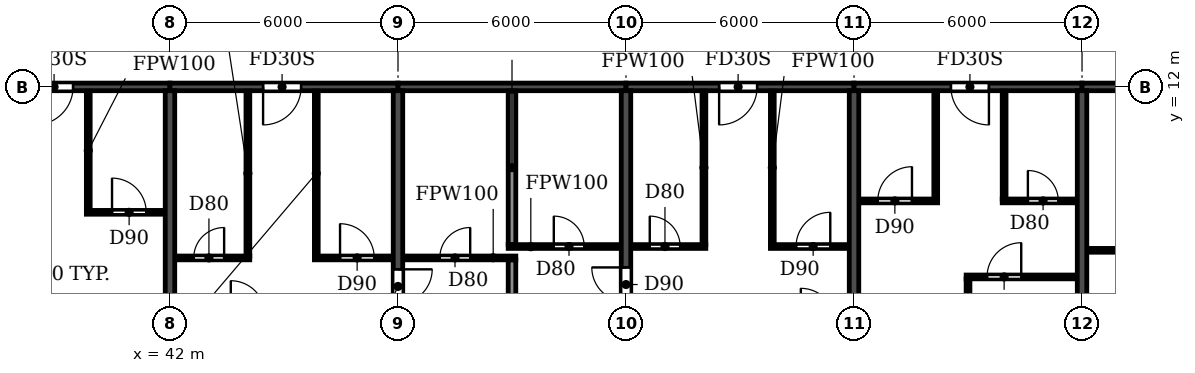
"""IFC4 building model, lengths in metres.
Left out: names, types, materials, properties, quantities, classifications, styles, units other than length and angle.
Written with IfcOpenShell. Run it as: python <this file> out.ifc"""

import sys

from ifc_helpers import new_model, si_unit, direction, frame, frame_2d, origin, place, context, subcontext, project, spatial, rectangle, extrude, element, fill, save


model = new_model("IFC4")
c1 = context("Model", 3, precision=1e-05, world=origin(), true_north=direction((0.0, 1.0)))
c2 = subcontext(c1, "Body", "Model", "MODEL_VIEW")
j1 = project(units=[si_unit("LENGTHUNIT", "METRE"), si_unit("PLANEANGLEUNIT", "RADIAN")], contexts=[c1])
p1 = place(None, origin())
s1 = spatial("IfcSite", under=j1, at=p1, CompositionType="ELEMENT")
p2 = place(p1, origin())
s2 = spatial("IfcBuilding", under=s1, at=p2, CompositionType="ELEMENT")
p3 = place(p2, frame((0.0, 0.0, 241.2)))
s3 = spatial("IfcBuildingStorey", under=s2, at=p3, CompositionType="ELEMENT", Elevation=241.2)
p4 = place(p3, frame((42.0, 0.2, 0.0), z_axis=(0.0, 0.0, 1.0), x_axis=(0.0, 1.0, 0.0)))
e1 = element("IfcWall", 1, at=p4, inside=s3, PredefinedType="SHEAR", context=c2, shape_type="SweptSolid", body=[
    extrude(rectangle(XDim=11.7, YDim=0.25, at=frame_2d((5.85, 0.0))), origin(), (0.0, 0.0, 1.0), 3.08),
])
p5 = place(p3, frame((48.0, 0.2, 0.0), z_axis=(0.0, 0.0, 1.0), x_axis=(0.0, 1.0, 0.0)))
e2 = element("IfcWall", 2, at=p5, inside=s3, PredefinedType="SHEAR", context=c2, shape_type="SweptSolid", body=[
    extrude(rectangle(XDim=11.7, YDim=0.25, at=frame_2d((5.85, 0.0))), origin(), (0.0, 0.0, 1.0), 3.08),
])
p6 = place(p5, frame((6.1, 0.0, 0.0)))
e3 = element("IfcOpeningElement", 3, at=p6, cuts=e2, PredefinedType="OPENING", context=c2, shape_type="SweptSolid", body=[
    extrude(rectangle(XDim=0.9, YDim=2.1, at=frame_2d((0.45, 1.05))), frame((0.0, 0.135, 0.0), z_axis=(0.0, -1.0, 0.0), x_axis=(1.0, 0.0, 0.0)), (0.0, 0.0, 1.0), 0.27),
])
p7 = place(p3, frame((54.0, 0.2, 0.0), z_axis=(0.0, 0.0, 1.0), x_axis=(0.0, 1.0, 0.0)))
e4 = element("IfcWall", 4, at=p7, inside=s3, PredefinedType="SHEAR", context=c2, shape_type="SweptSolid", body=[
    extrude(rectangle(XDim=11.7, YDim=0.25, at=frame_2d((5.85, 0.0))), origin(), (0.0, 0.0, 1.0), 3.08),
])
p8 = place(p7, frame((6.15, 0.0, 0.0)))
e5 = element("IfcOpeningElement", 5, at=p8, cuts=e4, PredefinedType="OPENING", context=c2, shape_type="SweptSolid", body=[
    extrude(rectangle(XDim=0.9, YDim=2.1, at=frame_2d((0.45, 1.05))), frame((0.0, 0.135, 0.0), z_axis=(0.0, -1.0, 0.0), x_axis=(1.0, 0.0, 0.0)), (0.0, 0.0, 1.0), 0.27),
])
for number, where, z_axis, x_axis in (
    (6, (60.0, 0.2, 0.0), (0.0, 0.0, 1.0), (0.0, 1.0, 0.0)),
    (7, (66.0, 0.2, 0.0), (0.0, 0.0, 1.0), (0.0, 1.0, 0.0)),
):
    element("IfcWall", number, at=place(p3, frame(where, z_axis=z_axis, x_axis=x_axis)), inside=s3, PredefinedType="SHEAR", context=c2, shape_type="SweptSolid", body=[
        extrude(rectangle(XDim=11.7, YDim=0.25, at=frame_2d((5.85, 0.0))), origin(), (0.0, 0.0, 1.0), 3.08),
    ])
p9 = place(p3, frame((36.0, 12.0, 0.0), z_axis=(0.0, 0.0, 1.0), x_axis=(1.0, 0.0, 0.0)))
e8 = element("IfcWall", 8, at=p9, inside=s3, PredefinedType="SHEAR", context=c2, shape_type="SweptSolid", body=[
    extrude(rectangle(XDim=6.0, YDim=0.2, at=frame_2d((3.0, 0.0))), origin(), (0.0, 0.0, 1.0), 2.48),
])
p10 = place(p9, frame((2.45, 0.0, 0.0)))
e9 = element("IfcOpeningElement", 9, at=p10, cuts=e8, PredefinedType="OPENING", context=c2, shape_type="SweptSolid", body=[
    extrude(rectangle(XDim=1.0, YDim=2.1, at=frame_2d((0.5, 1.05))), frame((0.0, 0.11, 0.0), z_axis=(0.0, -1.0, 0.0), x_axis=(1.0, 0.0, 0.0)), (0.0, 0.0, 1.0), 0.22),
])
p11 = place(p3, frame((42.0, 12.0, 0.0), z_axis=(0.0, 0.0, 1.0), x_axis=(1.0, 0.0, 0.0)))
e10 = element("IfcWall", 10, at=p11, inside=s3, PredefinedType="SHEAR", context=c2, shape_type="SweptSolid", body=[
    extrude(rectangle(XDim=6.0, YDim=0.2, at=frame_2d((3.0, 0.0))), origin(), (0.0, 0.0, 1.0), 2.48),
])
p12 = place(p11, frame((2.45, 0.0, 0.0)))
e11 = element("IfcOpeningElement", 11, at=p12, cuts=e10, PredefinedType="OPENING", context=c2, shape_type="SweptSolid", body=[
    extrude(rectangle(XDim=1.0, YDim=2.1, at=frame_2d((0.5, 1.05))), frame((0.0, 0.11, 0.0), z_axis=(0.0, -1.0, 0.0), x_axis=(1.0, 0.0, 0.0)), (0.0, 0.0, 1.0), 0.22),
])
p13 = place(p3, frame((48.0, 12.0, 0.0), z_axis=(0.0, 0.0, 1.0), x_axis=(1.0, 0.0, 0.0)))
e12 = element("IfcWall", 12, at=p13, inside=s3, PredefinedType="SHEAR", context=c2, shape_type="SweptSolid", body=[
    extrude(rectangle(XDim=6.0, YDim=0.2, at=frame_2d((3.0, 0.0))), origin(), (0.0, 0.0, 1.0), 2.48),
])
p14 = place(p3, frame((54.0, 12.0, 0.0), z_axis=(0.0, 0.0, 1.0), x_axis=(1.0, 0.0, 0.0)))
e13 = element("IfcWall", 13, at=p14, inside=s3, PredefinedType="SHEAR", context=c2, shape_type="SweptSolid", body=[
    extrude(rectangle(XDim=6.0, YDim=0.2, at=frame_2d((3.0, 0.0))), origin(), (0.0, 0.0, 1.0), 2.48),
])
p15 = place(p14, frame((2.45, 0.0, 0.0)))
e14 = element("IfcOpeningElement", 14, at=p15, cuts=e13, PredefinedType="OPENING", context=c2, shape_type="SweptSolid", body=[
    extrude(rectangle(XDim=1.0, YDim=2.1, at=frame_2d((0.5, 1.05))), frame((0.0, 0.11, 0.0), z_axis=(0.0, -1.0, 0.0), x_axis=(1.0, 0.0, 0.0)), (0.0, 0.0, 1.0), 0.22),
])
p16 = place(p3, frame((60.0, 12.0, 0.0), z_axis=(0.0, 0.0, 1.0), x_axis=(1.0, 0.0, 0.0)))
e15 = element("IfcWall", 15, at=p16, inside=s3, PredefinedType="SHEAR", context=c2, shape_type="SweptSolid", body=[
    extrude(rectangle(XDim=6.0, YDim=0.2, at=frame_2d((3.0, 0.0))), origin(), (0.0, 0.0, 1.0), 2.48),
])
p17 = place(p16, frame((2.55, 0.0, 0.0)))
e16 = element("IfcOpeningElement", 16, at=p17, cuts=e15, PredefinedType="OPENING", context=c2, shape_type="SweptSolid", body=[
    extrude(rectangle(XDim=1.0, YDim=2.1, at=frame_2d((0.5, 1.05))), frame((0.0, 0.11, 0.0), z_axis=(0.0, -1.0, 0.0), x_axis=(1.0, 0.0, 0.0)), (0.0, 0.0, 1.0), 0.22),
])
p18 = place(p3, frame((66.0, 12.0, 0.0), z_axis=(0.0, 0.0, 1.0), x_axis=(1.0, 0.0, 0.0)))
e17 = element("IfcWall", 17, at=p18, inside=s3, PredefinedType="SHEAR", context=c2, shape_type="SweptSolid", body=[
    extrude(rectangle(XDim=6.0, YDim=0.2, at=frame_2d((3.0, 0.0))), origin(), (0.0, 0.0, 1.0), 2.48),
])
p19 = place(p18, frame((2.55, 0.0, 0.0)))
e18 = element("IfcOpeningElement", 18, at=p19, cuts=e17, PredefinedType="OPENING", context=c2, shape_type="SweptSolid", body=[
    extrude(rectangle(XDim=1.0, YDim=2.1, at=frame_2d((0.5, 1.05))), frame((0.0, 0.11, 0.0), z_axis=(0.0, -1.0, 0.0), x_axis=(1.0, 0.0, 0.0)), (0.0, 0.0, 1.0), 0.22),
])
p20 = place(p3, frame((51.0, 0.06, 0.0), z_axis=(0.0, 0.0, 1.0), x_axis=(0.0, 1.0, 0.0)))
e19 = element("IfcWall", 19, at=p20, inside=s3, PredefinedType="PARTITIONING", context=c2, shape_type="SweptSolid", body=[
    extrude(rectangle(XDim=7.39, YDim=0.2, at=frame_2d((3.695, 0.0))), origin(), (0.0, 0.0, 1.0), 3.08),
])
p21 = place(p3, frame((51.0, 7.85, 0.0), z_axis=(0.0, 0.0, 1.0), x_axis=(0.0, 1.0, 0.0)))
e20 = element("IfcWall", 20, at=p21, inside=s3, PredefinedType="PARTITIONING", context=c2, shape_type="SweptSolid", body=[
    extrude(rectangle(XDim=4.04, YDim=0.2, at=frame_2d((2.02, 0.0))), origin(), (0.0, 0.0, 1.0), 3.08),
])
p22 = place(p3, frame((62.95, 7.0, 0.0), z_axis=(0.0, 0.0, 1.0), x_axis=(1.0, 0.0, 0.0)))
e21 = element("IfcWall", 21, at=p22, inside=s3, PredefinedType="PARTITIONING", context=c2, shape_type="SweptSolid", body=[
    extrude(rectangle(XDim=2.915, YDim=0.1, at=frame_2d((1.458, 0.0))), origin(), (0.0, 0.0, 1.0), 3.08),
])
p23 = place(p22, frame((0.55, 0.0, 0.0)))
e22 = element("IfcOpeningElement", 22, at=p23, cuts=e21, PredefinedType="OPENING", context=c2, shape_type="SweptSolid", body=[
    extrude(rectangle(XDim=0.9, YDim=2.1, at=frame_2d((0.45, 1.05))), frame((0.0, 0.06, 0.0), z_axis=(0.0, -1.0, 0.0), x_axis=(1.0, 0.0, 0.0)), (0.0, 0.0, 1.0), 0.12),
])
p24 = place(p3, frame((42.135, 7.5, 0.0), z_axis=(0.0, 0.0, 1.0), x_axis=(1.0, 0.0, 0.0)))
e23 = element("IfcWall", 23, at=p24, inside=s3, PredefinedType="PARTITIONING", context=c2, shape_type="SweptSolid", body=[
    extrude(rectangle(XDim=1.965, YDim=0.1, at=frame_2d((0.982, 0.0))), origin(), (0.0, 0.0, 1.0), 3.08),
])
p25 = place(p24, frame((0.49, 0.0, 0.0)))
e24 = element("IfcOpeningElement", 24, at=p25, cuts=e23, PredefinedType="OPENING", context=c2, shape_type="SweptSolid", body=[
    extrude(rectangle(XDim=0.8, YDim=2.1, at=frame_2d((0.4, 1.05))), frame((0.0, 0.06, 0.0), z_axis=(0.0, -1.0, 0.0), x_axis=(1.0, 0.0, 0.0)), (0.0, 0.0, 1.0), 0.12),
])
p26 = place(p3, frame((45.8, 7.5, 0.0), z_axis=(0.0, 0.0, 1.0), x_axis=(1.0, 0.0, 0.0)))
e25 = element("IfcWall", 25, at=p26, inside=s3, PredefinedType="PARTITIONING", context=c2, shape_type="SweptSolid", body=[
    extrude(rectangle(XDim=2.065, YDim=0.1, at=frame_2d((1.032, 0.0))), origin(), (0.0, 0.0, 1.0), 3.08),
])
p27 = place(p26, frame((0.675, 0.0, 0.0)))
e26 = element("IfcOpeningElement", 26, at=p27, cuts=e25, PredefinedType="OPENING", context=c2, shape_type="SweptSolid", body=[
    extrude(rectangle(XDim=0.9, YDim=2.1, at=frame_2d((0.45, 1.05))), frame((0.0, 0.06, 0.0), z_axis=(0.0, -1.0, 0.0), x_axis=(1.0, 0.0, 0.0)), (0.0, 0.0, 1.0), 0.12),
])
p28 = place(p3, frame((48.135, 7.5, 0.0), z_axis=(0.0, 0.0, 1.0), x_axis=(1.0, 0.0, 0.0)))
e27 = element("IfcWall", 27, at=p28, inside=s3, PredefinedType="PARTITIONING", context=c2, shape_type="SweptSolid", body=[
    extrude(rectangle(XDim=2.965, YDim=0.1, at=frame_2d((1.482, 0.0))), origin(), (0.0, 0.0, 1.0), 3.08),
])
p29 = place(p28, frame((0.965, 0.0, 0.0)))
e28 = element("IfcOpeningElement", 28, at=p29, cuts=e27, PredefinedType="OPENING", context=c2, shape_type="SweptSolid", body=[
    extrude(rectangle(XDim=0.8, YDim=2.1, at=frame_2d((0.4, 1.05))), frame((0.0, 0.06, 0.0), z_axis=(0.0, -1.0, 0.0), x_axis=(1.0, 0.0, 0.0)), (0.0, 0.0, 1.0), 0.12),
])
p30 = place(p3, frame((66.135, 7.7, 0.0), z_axis=(0.0, 0.0, 1.0), x_axis=(1.0, 0.0, 0.0)))
e29 = element("IfcWall", 29, at=p30, inside=s3, PredefinedType="PARTITIONING", context=c2, shape_type="SweptSolid", body=[
    extrude(rectangle(XDim=2.065, YDim=0.1, at=frame_2d((1.032, 0.0))), origin(), (0.0, 0.0, 1.0), 3.08),
])
p31 = place(p3, frame((50.9, 7.8, 0.0), z_axis=(0.0, 0.0, 1.0), x_axis=(1.0, 0.0, 0.0)))
e30 = element("IfcWall", 30, at=p31, inside=s3, PredefinedType="PARTITIONING", context=c2, shape_type="SweptSolid", body=[
    extrude(rectangle(XDim=2.965, YDim=0.1, at=frame_2d((1.482, 0.0))), origin(), (0.0, 0.0, 1.0), 3.08),
])
p32 = place(p31, frame((1.2, 0.0, 0.0)))
e31 = element("IfcOpeningElement", 31, at=p32, cuts=e30, PredefinedType="OPENING", context=c2, shape_type="SweptSolid", body=[
    extrude(rectangle(XDim=0.8, YDim=2.1, at=frame_2d((0.4, 1.05))), frame((0.0, 0.06, 0.0), z_axis=(0.0, -1.0, 0.0), x_axis=(1.0, 0.0, 0.0)), (0.0, 0.0, 1.0), 0.12),
])
p33 = place(p3, frame((54.135, 7.8, 0.0), z_axis=(0.0, 0.0, 1.0), x_axis=(1.0, 0.0, 0.0)))
e32 = element("IfcWall", 32, at=p33, inside=s3, PredefinedType="PARTITIONING", context=c2, shape_type="SweptSolid", body=[
    extrude(rectangle(XDim=1.965, YDim=0.1, at=frame_2d((0.982, 0.0))), origin(), (0.0, 0.0, 1.0), 3.08),
])
p34 = place(p33, frame((0.49, 0.0, 0.0)))
e33 = element("IfcOpeningElement", 33, at=p34, cuts=e32, PredefinedType="OPENING", context=c2, shape_type="SweptSolid", body=[
    extrude(rectangle(XDim=0.8, YDim=2.1, at=frame_2d((0.4, 1.05))), frame((0.0, 0.06, 0.0), z_axis=(0.0, -1.0, 0.0), x_axis=(1.0, 0.0, 0.0)), (0.0, 0.0, 1.0), 0.12),
])
p35 = place(p3, frame((57.8, 7.8, 0.0), z_axis=(0.0, 0.0, 1.0), x_axis=(1.0, 0.0, 0.0)))
e34 = element("IfcWall", 34, at=p35, inside=s3, PredefinedType="PARTITIONING", context=c2, shape_type="SweptSolid", body=[
    extrude(rectangle(XDim=2.065, YDim=0.1, at=frame_2d((1.032, 0.0))), origin(), (0.0, 0.0, 1.0), 3.08),
])
p36 = place(p35, frame((0.675, 0.0, 0.0)))
e35 = element("IfcOpeningElement", 35, at=p36, cuts=e34, PredefinedType="OPENING", context=c2, shape_type="SweptSolid", body=[
    extrude(rectangle(XDim=0.9, YDim=2.1, at=frame_2d((0.45, 1.05))), frame((0.0, 0.06, 0.0), z_axis=(0.0, -1.0, 0.0), x_axis=(1.0, 0.0, 0.0)), (0.0, 0.0, 1.0), 0.12),
])
p37 = place(p3, frame((39.8, 8.7, 0.0), z_axis=(0.0, 0.0, 1.0), x_axis=(1.0, 0.0, 0.0)))
e36 = element("IfcWall", 36, at=p37, inside=s3, PredefinedType="PARTITIONING", context=c2, shape_type="SweptSolid", body=[
    extrude(rectangle(XDim=2.065, YDim=0.1, at=frame_2d((1.032, 0.0))), origin(), (0.0, 0.0, 1.0), 3.08),
])
p38 = place(p37, frame((0.675, 0.0, 0.0)))
e37 = element("IfcOpeningElement", 37, at=p38, cuts=e36, PredefinedType="OPENING", context=c2, shape_type="SweptSolid", body=[
    extrude(rectangle(XDim=0.9, YDim=2.1, at=frame_2d((0.45, 1.05))), frame((0.0, 0.06, 0.0), z_axis=(0.0, -1.0, 0.0), x_axis=(1.0, 0.0, 0.0)), (0.0, 0.0, 1.0), 0.12),
])
p39 = place(p3, frame((60.135, 9.0, 0.0), z_axis=(0.0, 0.0, 1.0), x_axis=(1.0, 0.0, 0.0)))
e38 = element("IfcWall", 38, at=p39, inside=s3, PredefinedType="PARTITIONING", context=c2, shape_type="SweptSolid", body=[
    extrude(rectangle(XDim=2.065, YDim=0.1, at=frame_2d((1.032, 0.0))), origin(), (0.0, 0.0, 1.0), 3.08),
])
p40 = place(p39, frame((0.49, 0.0, 0.0)))
e39 = element("IfcOpeningElement", 39, at=p40, cuts=e38, PredefinedType="OPENING", context=c2, shape_type="SweptSolid", body=[
    extrude(rectangle(XDim=0.9, YDim=2.1, at=frame_2d((0.45, 1.05))), frame((0.0, 0.06, 0.0), z_axis=(0.0, -1.0, 0.0), x_axis=(1.0, 0.0, 0.0)), (0.0, 0.0, 1.0), 0.12),
])
p41 = place(p3, frame((63.9, 9.0, 0.0), z_axis=(0.0, 0.0, 1.0), x_axis=(1.0, 0.0, 0.0)))
e40 = element("IfcWall", 40, at=p41, inside=s3, PredefinedType="PARTITIONING", context=c2, shape_type="SweptSolid", body=[
    extrude(rectangle(XDim=1.965, YDim=0.1, at=frame_2d((0.982, 0.0))), origin(), (0.0, 0.0, 1.0), 3.08),
])
p42 = place(p41, frame((0.675, 0.0, 0.0)))
e41 = element("IfcOpeningElement", 41, at=p42, cuts=e40, PredefinedType="OPENING", context=c2, shape_type="SweptSolid", body=[
    extrude(rectangle(XDim=0.8, YDim=2.1, at=frame_2d((0.4, 1.05))), frame((0.0, 0.06, 0.0), z_axis=(0.0, -1.0, 0.0), x_axis=(1.0, 0.0, 0.0)), (0.0, 0.0, 1.0), 0.12),
])
p43 = place(p3, frame((39.85, 8.75, 0.0), z_axis=(0.0, 0.0, 1.0), x_axis=(0.0, 1.0, 0.0)))
e42 = element("IfcWall", 42, at=p43, inside=s3, PredefinedType="PARTITIONING", context=c2, shape_type="SweptSolid", body=[
    extrude(rectangle(XDim=3.14, YDim=0.1, at=frame_2d((1.57, 0.0))), origin(), (0.0, 0.0, 1.0), 3.08),
])
for number, where, z_axis, x_axis in (
    (43, (44.05, 7.55, 0.0), (0.0, 0.0, 1.0), (0.0, 1.0, 0.0)),
    (44, (45.85, 7.55, 0.0), (0.0, 0.0, 1.0), (0.0, 1.0, 0.0)),
):
    element("IfcWall", number, at=place(p3, frame(where, z_axis=z_axis, x_axis=x_axis)), inside=s3, PredefinedType="PARTITIONING", context=c2, shape_type="SweptSolid", body=[
        extrude(rectangle(XDim=4.34, YDim=0.1, at=frame_2d((2.17, 0.0))), origin(), (0.0, 0.0, 1.0), 3.08),
    ])
for number, where, z_axis, x_axis in (
    (45, (56.05, 7.85, 0.0), (0.0, 0.0, 1.0), (0.0, 1.0, 0.0)),
    (46, (57.85, 7.85, 0.0), (0.0, 0.0, 1.0), (0.0, 1.0, 0.0)),
):
    element("IfcWall", number, at=place(p3, frame(where, z_axis=z_axis, x_axis=x_axis)), inside=s3, PredefinedType="PARTITIONING", context=c2, shape_type="SweptSolid", body=[
        extrude(rectangle(XDim=4.04, YDim=0.1, at=frame_2d((2.02, 0.0))), origin(), (0.0, 0.0, 1.0), 3.08),
    ])
p44 = place(p3, frame((62.15, 9.05, 0.0), z_axis=(0.0, 0.0, 1.0), x_axis=(0.0, 1.0, 0.0)))
e47 = element("IfcWall", 47, at=p44, inside=s3, PredefinedType="PARTITIONING", context=c2, shape_type="SweptSolid", body=[
    extrude(rectangle(XDim=2.84, YDim=0.1, at=frame_2d((1.42, 0.0))), origin(), (0.0, 0.0, 1.0), 3.08),
])
p45 = place(p3, frame((63.0, 0.06, 0.0), z_axis=(0.0, 0.0, 1.0), x_axis=(0.0, 1.0, 0.0)))
e48 = element("IfcWall", 48, at=p45, inside=s3, PredefinedType="PARTITIONING", context=c2, shape_type="SweptSolid", body=[
    extrude(rectangle(XDim=6.89, YDim=0.1, at=frame_2d((3.445, 0.0))), origin(), (0.0, 0.0, 1.0), 3.08),
])
p46 = place(p3, frame((63.95, 9.05, 0.0), z_axis=(0.0, 0.0, 1.0), x_axis=(0.0, 1.0, 0.0)))
e49 = element("IfcWall", 49, at=p46, inside=s3, PredefinedType="PARTITIONING", context=c2, shape_type="SweptSolid", body=[
    extrude(rectangle(XDim=2.84, YDim=0.1, at=frame_2d((1.42, 0.0))), origin(), (0.0, 0.0, 1.0), 3.08),
])
p47 = place(p10, frame((1.0, 0.0, 0.0), z_axis=(0.0, 0.0, 1.0), x_axis=(-1.0, 0.0, 0.0)))
e50 = element("IfcDoor", 50, at=p47, inside=s3, OperationType="SINGLE_SWING_RIGHT", PredefinedType="DOOR", context=c2, shape_type="SweptSolid", body=[
    extrude(rectangle(XDim=1.0, YDim=2.1, at=frame_2d((0.5, 1.05))), frame((0.0, 0.025, 0.0), z_axis=(0.0, -1.0, 0.0), x_axis=(1.0, 0.0, 0.0)), (0.0, 0.0, 1.0), 0.05),
])
fill(e9, e50)
p48 = place(p38, origin())
e51 = element("IfcDoor", 51, at=p48, inside=s3, OperationType="SINGLE_SWING_LEFT", PredefinedType="DOOR", context=c2, shape_type="SweptSolid", body=[
    extrude(rectangle(XDim=0.9, YDim=2.1, at=frame_2d((0.45, 1.05))), frame((0.0, 0.025, 0.0), z_axis=(0.0, -1.0, 0.0), x_axis=(1.0, 0.0, 0.0)), (0.0, 0.0, 1.0), 0.05),
])
fill(e37, e51)
p49 = place(p29, origin())
e52 = element("IfcDoor", 52, at=p49, inside=s3, OperationType="SINGLE_SWING_RIGHT", PredefinedType="DOOR", context=c2, shape_type="SweptSolid", body=[
    extrude(rectangle(XDim=0.8, YDim=2.1, at=frame_2d((0.4, 1.05))), frame((0.0, 0.025, 0.0), z_axis=(0.0, -1.0, 0.0), x_axis=(1.0, 0.0, 0.0)), (0.0, 0.0, 1.0), 0.05),
])
fill(e28, e52)
p50 = place(p25, origin())
e53 = element("IfcDoor", 53, at=p50, inside=s3, OperationType="SINGLE_SWING_RIGHT", PredefinedType="DOOR", context=c2, shape_type="SweptSolid", body=[
    extrude(rectangle(XDim=0.8, YDim=2.1, at=frame_2d((0.4, 1.05))), frame((0.0, 0.025, 0.0), z_axis=(0.0, -1.0, 0.0), x_axis=(1.0, 0.0, 0.0)), (0.0, 0.0, 1.0), 0.05),
])
fill(e24, e53)
p51 = place(p12, frame((1.0, 0.0, 0.0), z_axis=(0.0, 0.0, 1.0), x_axis=(-1.0, 0.0, 0.0)))
e54 = element("IfcDoor", 54, at=p51, inside=s3, OperationType="SINGLE_SWING_RIGHT", PredefinedType="DOOR", context=c2, shape_type="SweptSolid", body=[
    extrude(rectangle(XDim=1.0, YDim=2.1, at=frame_2d((0.5, 1.05))), frame((0.0, 0.025, 0.0), z_axis=(0.0, -1.0, 0.0), x_axis=(1.0, 0.0, 0.0)), (0.0, 0.0, 1.0), 0.05),
])
fill(e11, e54)
p52 = place(p27, origin())
e55 = element("IfcDoor", 55, at=p52, inside=s3, OperationType="SINGLE_SWING_LEFT", PredefinedType="DOOR", context=c2, shape_type="SweptSolid", body=[
    extrude(rectangle(XDim=0.9, YDim=2.1, at=frame_2d((0.45, 1.05))), frame((0.0, 0.025, 0.0), z_axis=(0.0, -1.0, 0.0), x_axis=(1.0, 0.0, 0.0)), (0.0, 0.0, 1.0), 0.05),
])
fill(e26, e55)
p53 = place(p6, frame((0.9, 0.0, 0.0), z_axis=(0.0, 0.0, 1.0), x_axis=(-1.0, 0.0, 0.0)))
e56 = element("IfcDoor", 56, at=p53, inside=s3, OperationType="SINGLE_SWING_LEFT", PredefinedType="DOOR", context=c2, shape_type="SweptSolid", body=[
    extrude(rectangle(XDim=0.9, YDim=2.1, at=frame_2d((0.45, 1.05))), frame((0.0, 0.025, 0.0), z_axis=(0.0, -1.0, 0.0), x_axis=(1.0, 0.0, 0.0)), (0.0, 0.0, 1.0), 0.05),
])
fill(e3, e56)
p54 = place(p32, origin())
e57 = element("IfcDoor", 57, at=p54, inside=s3, OperationType="SINGLE_SWING_LEFT", PredefinedType="DOOR", context=c2, shape_type="SweptSolid", body=[
    extrude(rectangle(XDim=0.8, YDim=2.1, at=frame_2d((0.4, 1.05))), frame((0.0, 0.025, 0.0), z_axis=(0.0, -1.0, 0.0), x_axis=(1.0, 0.0, 0.0)), (0.0, 0.0, 1.0), 0.05),
])
fill(e31, e57)
p55 = place(p8, origin())
e58 = element("IfcDoor", 58, at=p55, inside=s3, OperationType="SINGLE_SWING_RIGHT", PredefinedType="DOOR", context=c2, shape_type="SweptSolid", body=[
    extrude(rectangle(XDim=0.9, YDim=2.1, at=frame_2d((0.45, 1.05))), frame((0.0, 0.025, 0.0), z_axis=(0.0, -1.0, 0.0), x_axis=(1.0, 0.0, 0.0)), (0.0, 0.0, 1.0), 0.05),
])
fill(e5, e58)
p56 = place(p34, origin())
e59 = element("IfcDoor", 59, at=p56, inside=s3, OperationType="SINGLE_SWING_LEFT", PredefinedType="DOOR", context=c2, shape_type="SweptSolid", body=[
    extrude(rectangle(XDim=0.8, YDim=2.1, at=frame_2d((0.4, 1.05))), frame((0.0, 0.025, 0.0), z_axis=(0.0, -1.0, 0.0), x_axis=(1.0, 0.0, 0.0)), (0.0, 0.0, 1.0), 0.05),
])
fill(e33, e59)
p57 = place(p15, frame((1.0, 0.0, 0.0), z_axis=(0.0, 0.0, 1.0), x_axis=(-1.0, 0.0, 0.0)))
e60 = element("IfcDoor", 60, at=p57, inside=s3, OperationType="SINGLE_SWING_RIGHT", PredefinedType="DOOR", context=c2, shape_type="SweptSolid", body=[
    extrude(rectangle(XDim=1.0, YDim=2.1, at=frame_2d((0.5, 1.05))), frame((0.0, 0.025, 0.0), z_axis=(0.0, -1.0, 0.0), x_axis=(1.0, 0.0, 0.0)), (0.0, 0.0, 1.0), 0.05),
])
fill(e14, e60)
p58 = place(p36, origin())
e61 = element("IfcDoor", 61, at=p58, inside=s3, OperationType="SINGLE_SWING_RIGHT", PredefinedType="DOOR", context=c2, shape_type="SweptSolid", body=[
    extrude(rectangle(XDim=0.9, YDim=2.1, at=frame_2d((0.45, 1.05))), frame((0.0, 0.025, 0.0), z_axis=(0.0, -1.0, 0.0), x_axis=(1.0, 0.0, 0.0)), (0.0, 0.0, 1.0), 0.05),
])
fill(e35, e61)
p59 = place(p40, origin())
e62 = element("IfcDoor", 62, at=p59, inside=s3, OperationType="SINGLE_SWING_RIGHT", PredefinedType="DOOR", context=c2, shape_type="SweptSolid", body=[
    extrude(rectangle(XDim=0.9, YDim=2.1, at=frame_2d((0.45, 1.05))), frame((0.0, 0.025, 0.0), z_axis=(0.0, -1.0, 0.0), x_axis=(1.0, 0.0, 0.0)), (0.0, 0.0, 1.0), 0.05),
])
fill(e39, e62)
p60 = place(p17, frame((1.0, 0.0, 0.0), z_axis=(0.0, 0.0, 1.0), x_axis=(-1.0, 0.0, 0.0)))
e63 = element("IfcDoor", 63, at=p60, inside=s3, OperationType="SINGLE_SWING_LEFT", PredefinedType="DOOR", context=c2, shape_type="SweptSolid", body=[
    extrude(rectangle(XDim=1.0, YDim=2.1, at=frame_2d((0.5, 1.05))), frame((0.0, 0.025, 0.0), z_axis=(0.0, -1.0, 0.0), x_axis=(1.0, 0.0, 0.0)), (0.0, 0.0, 1.0), 0.05),
])
fill(e16, e63)
p61 = place(p23, origin())
e64 = element("IfcDoor", 64, at=p61, inside=s3, OperationType="SINGLE_SWING_RIGHT", PredefinedType="DOOR", context=c2, shape_type="SweptSolid", body=[
    extrude(rectangle(XDim=0.9, YDim=2.1, at=frame_2d((0.45, 1.05))), frame((0.0, 0.025, 0.0), z_axis=(0.0, -1.0, 0.0), x_axis=(1.0, 0.0, 0.0)), (0.0, 0.0, 1.0), 0.05),
])
fill(e22, e64)
p62 = place(p42, origin())
e65 = element("IfcDoor", 65, at=p62, inside=s3, OperationType="SINGLE_SWING_LEFT", PredefinedType="DOOR", context=c2, shape_type="SweptSolid", body=[
    extrude(rectangle(XDim=0.8, YDim=2.1, at=frame_2d((0.4, 1.05))), frame((0.0, 0.025, 0.0), z_axis=(0.0, -1.0, 0.0), x_axis=(1.0, 0.0, 0.0)), (0.0, 0.0, 1.0), 0.05),
])
fill(e41, e65)
save(model, sys.argv[1])
